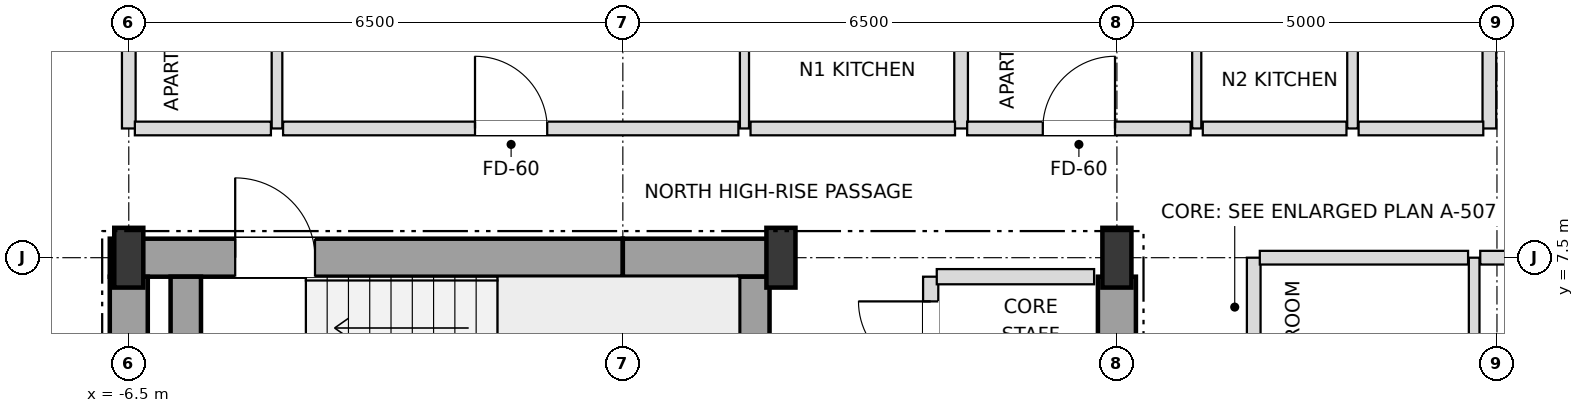
"""IFC4 building model, lengths in metres.
Left out: names, types, materials, properties, quantities, classifications, styles, units other than length and angle.
Written with IfcOpenShell. Run it as: python <this file> out.ifc"""

import sys

from ifc_helpers import new_model, si_unit, direction, frame, frame_2d, origin, origin_2d, place, context, subcontext, project, spatial, rectangle, i_section, extrude, element, fill, save


model = new_model("IFC4")
c1 = context("Model", 3, precision=1e-05, world=origin(), true_north=direction((0.0, 1.0)))
c2 = subcontext(c1, "Body", "Model", "MODEL_VIEW")
j1 = project(units=[si_unit("LENGTHUNIT", "METRE"), si_unit("PLANEANGLEUNIT", "RADIAN")], contexts=[c1])
p1 = place(None, origin())
s1 = spatial("IfcSite", under=j1, at=p1, CompositionType="ELEMENT")
p2 = place(p1, origin())
s2 = spatial("IfcBuilding", under=s1, at=p2, CompositionType="ELEMENT")
p3 = place(p2, frame((0.0, 0.0, 254.7)))
s3 = spatial("IfcBuildingStorey", under=s2, at=p3, CompositionType="ELEMENT", Elevation=254.7)
for number, where, z_axis, x_axis in (
    (1, (-6.5, 7.5, 0.0), (0.0, 0.0, 1.0), (1.0, 0.0, 0.0)),
    (2, (2.08, 7.5, 0.0), (0.0, 0.0, 1.0), (1.0, 0.0, 0.0)),
    (3, (6.5, 7.5, 0.0), (0.0, 0.0, 1.0), (1.0, 0.0, 0.0)),
):
    element("IfcColumn", number, at=place(p3, frame(where, z_axis=z_axis, x_axis=x_axis)), inside=s3, PredefinedType="COLUMN", context=c2, shape_type="SweptSolid", body=[
        extrude(i_section(OverallWidth=0.382, OverallDepth=0.786, WebThickness=0.02, FlangeThickness=0.033, at=origin_2d()), origin(), (0.0, 0.0, 1.0), 3.6),
    ])
p4 = place(p3, frame((-6.75, 7.5, 0.0), z_axis=(0.0, 0.0, 1.0), x_axis=(1.0, 0.0, 0.0)))
e4 = element("IfcWall", 4, at=p4, inside=s3, PredefinedType="SHEAR", context=c2, shape_type="SweptSolid", body=[
    extrude(rectangle(XDim=6.75, YDim=0.5, at=frame_2d((3.375, 0.0))), origin(), (0.0, 0.0, 1.0), 3.38),
])
p5 = place(p4, frame((1.65, 0.0, 0.0)))
e5 = element("IfcOpeningElement", 5, at=p5, cuts=e4, PredefinedType="OPENING", context=c2, shape_type="SweptSolid", body=[
    extrude(rectangle(XDim=1.05, YDim=2.15, at=frame_2d((0.525, 1.075))), frame((0.0, 0.26, 0.0), z_axis=(0.0, -1.0, 0.0), x_axis=(1.0, 0.0, 0.0)), (0.0, 0.0, 1.0), 0.52),
])
p6 = place(p3, frame((0.0, 7.5, 0.0), z_axis=(0.0, 0.0, 1.0), x_axis=(1.0, 0.0, 0.0)))
e6 = element("IfcWall", 6, at=p6, inside=s3, PredefinedType="SHEAR", context=c2, shape_type="SweptSolid", body=[
    extrude(rectangle(XDim=2.08, YDim=0.5, at=frame_2d((1.04, 0.0))), origin(), (0.0, 0.0, 1.0), 3.38),
])
for number, where, z_axis, x_axis in (
    (7, (-6.5, 3.95, 0.0), (0.0, 0.0, 1.0), (0.0, 1.0, 0.0)),
    (8, (6.5, 3.95, 0.0), (0.0, 0.0, 1.0), (0.0, 1.0, 0.0)),
):
    element("IfcWall", number, at=place(p3, frame(where, z_axis=z_axis, x_axis=x_axis)), inside=s3, PredefinedType="SHEAR", context=c2, shape_type="SweptSolid", body=[
        extrude(rectangle(XDim=3.3, YDim=0.5, at=frame_2d((1.65, 0.0))), origin(), (0.0, 0.0, 1.0), 3.38),
    ])
for number, where, z_axis, x_axis in (
    (9, (1.73, 3.95, 0.0), (0.0, 0.0, 1.0), (0.0, 1.0, 0.0)),
    (10, (-5.75, 3.95, 0.0), (0.0, 0.0, 1.0), (0.0, 1.0, 0.0)),
):
    element("IfcWall", number, at=place(p3, frame(where, z_axis=z_axis, x_axis=x_axis)), inside=s3, PredefinedType="SHEAR", context=c2, shape_type="SweptSolid", body=[
        extrude(rectangle(XDim=3.3, YDim=0.4, at=frame_2d((1.65, 0.0))), origin(), (0.0, 0.0, 1.0), 3.38),
    ])
p7 = place(p3, frame((-6.5, 9.2, 0.0), z_axis=(0.0, 0.0, 1.0), x_axis=(0.0, 1.0, 0.0)))
e11 = element("IfcWall", 11, at=p7, inside=s3, PredefinedType="PARTITIONING", context=c2, shape_type="SweptSolid", body=[
    extrude(rectangle(XDim=10.7, YDim=0.18, at=frame_2d((5.35, 0.0))), origin(), (0.0, 0.0, 1.0), 2.826),
])
p8 = place(p3, frame((-4.55, 9.2, 0.0), z_axis=(0.0, 0.0, 1.0), x_axis=(0.0, 1.0, 0.0)))
e12 = element("IfcWall", 12, at=p8, inside=s3, PredefinedType="PARTITIONING", context=c2, shape_type="SweptSolid", body=[
    extrude(rectangle(XDim=4.7, YDim=0.14, at=frame_2d((2.35, 0.0))), origin(), (0.0, 0.0, 1.0), 3.38),
])
p9 = place(p8, frame((1.9, 0.0, 0.0)))
e13 = element("IfcOpeningElement", 13, at=p9, cuts=e12, PredefinedType="OPENING", context=c2, shape_type="SweptSolid", body=[
    extrude(rectangle(XDim=0.9, YDim=2.1, at=frame_2d((0.45, 1.05))), frame((0.0, 0.08, 0.0), z_axis=(0.0, -1.0, 0.0), x_axis=(1.0, 0.0, 0.0)), (0.0, 0.0, 1.0), 0.16),
])
p10 = place(p3, frame((1.6, 9.2, 0.0), z_axis=(0.0, 0.0, 1.0), x_axis=(0.0, 1.0, 0.0)))
e14 = element("IfcWall", 14, at=p10, inside=s3, PredefinedType="PARTITIONING", context=c2, shape_type="SweptSolid", body=[
    extrude(rectangle(XDim=10.7, YDim=0.12, at=frame_2d((5.35, 0.0))), origin(), (0.0, 0.0, 1.0), 3.018),
])
p11 = place(p10, frame((1.875, 0.0, 0.0)))
e15 = element("IfcOpeningElement", 15, at=p11, cuts=e14, PredefinedType="OPENING", context=c2, shape_type="SweptSolid", body=[
    extrude(rectangle(XDim=0.95, YDim=2.1, at=frame_2d((0.475, 1.05))), frame((0.0, 0.07, 0.0), z_axis=(0.0, -1.0, 0.0), x_axis=(1.0, 0.0, 0.0)), (0.0, 0.0, 1.0), 0.14),
])
p12 = place(p10, frame((7.25, 0.0, 0.0)))
e16 = element("IfcOpeningElement", 16, at=p12, cuts=e14, PredefinedType="OPENING", context=c2, shape_type="SweptSolid", body=[
    extrude(rectangle(XDim=0.9, YDim=2.1, at=frame_2d((0.45, 1.05))), frame((0.0, 0.07, 0.0), z_axis=(0.0, -1.0, 0.0), x_axis=(1.0, 0.0, 0.0)), (0.0, 0.0, 1.0), 0.14),
])
p13 = place(p3, frame((4.05, 4.2, 0.0), z_axis=(0.0, 0.0, 1.0), x_axis=(0.0, 1.0, 0.0)))
e17 = element("IfcWall", 17, at=p13, inside=s3, PredefinedType="SOLIDWALL", context=c2, shape_type="SweptSolid", body=[
    extrude(rectangle(XDim=3.05, YDim=0.2, at=frame_2d((1.525, 0.0))), origin(), (0.0, 0.0, 1.0), 3.38),
])
p14 = place(p13, frame((0.275, 0.0, 0.0)))
e18 = element("IfcOpeningElement", 18, at=p14, cuts=e17, PredefinedType="OPENING", context=c2, shape_type="SweptSolid", body=[
    extrude(rectangle(XDim=0.95, YDim=2.15, at=frame_2d((0.475, 1.075))), frame((0.0, 0.11, 0.0), z_axis=(0.0, -1.0, 0.0), x_axis=(1.0, 0.0, 0.0)), (0.0, 0.0, 1.0), 0.22),
])
p15 = place(p13, frame((1.775, 0.0, 0.0)))
e19 = element("IfcOpeningElement", 19, at=p15, cuts=e17, PredefinedType="OPENING", context=c2, shape_type="SweptSolid", body=[
    extrude(rectangle(XDim=0.95, YDim=2.15, at=frame_2d((0.475, 1.075))), frame((0.0, 0.11, 0.0), z_axis=(0.0, -1.0, 0.0), x_axis=(1.0, 0.0, 0.0)), (0.0, 0.0, 1.0), 0.22),
])
p16 = place(p3, frame((4.45, 9.2, 0.0), z_axis=(0.0, 0.0, 1.0), x_axis=(0.0, 1.0, 0.0)))
e20 = element("IfcWall", 20, at=p16, inside=s3, PredefinedType="PARTITIONING", context=c2, shape_type="SweptSolid", body=[
    extrude(rectangle(XDim=10.7, YDim=0.18, at=frame_2d((5.35, 0.0))), origin(), (0.0, 0.0, 1.0), 3.018),
])
p17 = place(p3, frame((7.55, 9.2, 0.0), z_axis=(0.0, 0.0, 1.0), x_axis=(0.0, 1.0, 0.0)))
e21 = element("IfcWall", 21, at=p17, inside=s3, PredefinedType="PARTITIONING", context=c2, shape_type="SweptSolid", body=[
    extrude(rectangle(XDim=4.7, YDim=0.12, at=frame_2d((2.35, 0.0))), origin(), (0.0, 0.0, 1.0), 2.826),
])
p18 = place(p17, frame((1.875, 0.0, 0.0)))
e22 = element("IfcOpeningElement", 22, at=p18, cuts=e21, PredefinedType="OPENING", context=c2, shape_type="SweptSolid", body=[
    extrude(rectangle(XDim=0.95, YDim=2.1, at=frame_2d((0.475, 1.05))), frame((0.0, 0.07, 0.0), z_axis=(0.0, -1.0, 0.0), x_axis=(1.0, 0.0, 0.0)), (0.0, 0.0, 1.0), 0.14),
])
p19 = place(p3, frame((8.3, -7.5, 0.0), z_axis=(0.0, 0.0, 1.0), x_axis=(0.0, 1.0, 0.0)))
e23 = element("IfcWall", 23, at=p19, inside=s3, PredefinedType="PARTITIONING", context=c2, shape_type="SweptSolid", body=[
    extrude(rectangle(XDim=15.0, YDim=0.18, at=frame_2d((7.5, 0.0))), origin(), (0.0, 0.0, 1.0), 3.38),
])
p20 = place(p19, frame((2.355, 0.0, 0.0)))
e24 = element("IfcOpeningElement", 24, at=p20, cuts=e23, PredefinedType="OPENING", context=c2, shape_type="SweptSolid", body=[
    extrude(rectangle(XDim=0.95, YDim=2.15, at=frame_2d((0.475, 1.075))), frame((0.0, 0.1, 0.0), z_axis=(0.0, -1.0, 0.0), x_axis=(1.0, 0.0, 0.0)), (0.0, 0.0, 1.0), 0.2),
])
p21 = place(p3, frame((9.6, 9.2, 0.0), z_axis=(0.0, 0.0, 1.0), x_axis=(0.0, 1.0, 0.0)))
e25 = element("IfcWall", 25, at=p21, inside=s3, PredefinedType="PARTITIONING", context=c2, shape_type="SweptSolid", body=[
    extrude(rectangle(XDim=4.7, YDim=0.14, at=frame_2d((2.35, 0.0))), origin(), (0.0, 0.0, 1.0), 2.826),
])
p22 = place(p21, frame((1.9, 0.0, 0.0)))
e26 = element("IfcOpeningElement", 26, at=p22, cuts=e25, PredefinedType="OPENING", context=c2, shape_type="SweptSolid", body=[
    extrude(rectangle(XDim=0.9, YDim=2.1, at=frame_2d((0.45, 1.05))), frame((0.0, 0.08, 0.0), z_axis=(0.0, -1.0, 0.0), x_axis=(1.0, 0.0, 0.0)), (0.0, 0.0, 1.0), 0.16),
])
p23 = place(p3, frame((11.2, -7.5, 0.0), z_axis=(0.0, 0.0, 1.0), x_axis=(0.0, 1.0, 0.0)))
e27 = element("IfcWall", 27, at=p23, inside=s3, PredefinedType="PARTITIONING", context=c2, shape_type="SweptSolid", body=[
    extrude(rectangle(XDim=15.0, YDim=0.14, at=frame_2d((7.5, 0.0))), origin(), (0.0, 0.0, 1.0), 3.38),
])
p24 = place(p23, frame((3.475, 0.0, 0.0)))
e28 = element("IfcOpeningElement", 28, at=p24, cuts=e27, PredefinedType="OPENING", context=c2, shape_type="SweptSolid", body=[
    extrude(rectangle(XDim=0.95, YDim=2.1, at=frame_2d((0.475, 1.05))), frame((0.0, 0.08, 0.0), z_axis=(0.0, -1.0, 0.0), x_axis=(1.0, 0.0, 0.0)), (0.0, 0.0, 1.0), 0.16),
])
p25 = place(p3, frame((11.4, 9.2, 0.0), z_axis=(0.0, 0.0, 1.0), x_axis=(0.0, 1.0, 0.0)))
e29 = element("IfcWall", 29, at=p25, inside=s3, PredefinedType="PARTITIONING", context=c2, shape_type="SweptSolid", body=[
    extrude(rectangle(XDim=5.07, YDim=0.18, at=frame_2d((2.535, 0.0))), origin(), (0.0, 0.0, 1.0), 2.748),
])
p26 = place(p3, frame((4.13, 7.25, 0.0), z_axis=(0.0, 0.0, 1.0), x_axis=(1.0, 0.0, 0.0)))
e30 = element("IfcWall", 30, at=p26, inside=s3, PredefinedType="SOLIDWALL", context=c2, shape_type="SweptSolid", body=[
    extrude(rectangle(XDim=2.07, YDim=0.2, at=frame_2d((1.035, 0.0))), origin(), (0.0, 0.0, 1.0), 3.38),
])
p27 = place(p3, frame((8.38, 7.5, 0.0), z_axis=(0.0, 0.0, 1.0), x_axis=(1.0, 0.0, 0.0)))
e31 = element("IfcWall", 31, at=p27, inside=s3, PredefinedType="PARTITIONING", context=c2, shape_type="SweptSolid", body=[
    extrude(rectangle(XDim=2.74, YDim=0.18, at=frame_2d((1.37, 0.0))), origin(), (0.0, 0.0, 1.0), 2.826),
])
p28 = place(p3, frame((11.28, 7.5, 0.0), z_axis=(0.0, 0.0, 1.0), x_axis=(1.0, 0.0, 0.0)))
e32 = element("IfcWall", 32, at=p28, inside=s3, PredefinedType="PARTITIONING", context=c2, shape_type="SweptSolid", body=[
    extrude(rectangle(XDim=5.62, YDim=0.18, at=frame_2d((2.81, 0.0))), origin(), (0.0, 0.0, 1.0), 2.826),
])
p29 = place(p3, frame((-6.42, 9.2, 0.0), z_axis=(0.0, 0.0, 1.0), x_axis=(1.0, 0.0, 0.0)))
e33 = element("IfcWall", 33, at=p29, inside=s3, PredefinedType="PARTITIONING", context=c2, shape_type="SweptSolid", body=[
    extrude(rectangle(XDim=1.79, YDim=0.18, at=frame_2d((0.895, 0.0))), origin(), (0.0, 0.0, 1.0), 3.38),
])
p30 = place(p3, frame((-4.47, 9.2, 0.0), z_axis=(0.0, 0.0, 1.0), x_axis=(1.0, 0.0, 0.0)))
e34 = element("IfcWall", 34, at=p30, inside=s3, PredefinedType="PARTITIONING", context=c2, shape_type="SweptSolid", body=[
    extrude(rectangle(XDim=5.99, YDim=0.18, at=frame_2d((2.995, 0.0))), origin(), (0.0, 0.0, 1.0), 3.38),
])
p31 = place(p30, frame((2.525, 0.0, 0.0)))
e35 = element("IfcOpeningElement", 35, at=p31, cuts=e34, PredefinedType="OPENING", context=c2, shape_type="SweptSolid", body=[
    extrude(rectangle(XDim=0.95, YDim=2.15, at=frame_2d((0.475, 1.075))), frame((0.0, 0.1, 0.0), z_axis=(0.0, -1.0, 0.0), x_axis=(1.0, 0.0, 0.0)), (0.0, 0.0, 1.0), 0.2),
])
p32 = place(p3, frame((1.68, 9.2, 0.0), z_axis=(0.0, 0.0, 1.0), x_axis=(1.0, 0.0, 0.0)))
e36 = element("IfcWall", 36, at=p32, inside=s3, PredefinedType="PARTITIONING", context=c2, shape_type="SweptSolid", body=[
    extrude(rectangle(XDim=2.69, YDim=0.18, at=frame_2d((1.345, 0.0))), origin(), (0.0, 0.0, 1.0), 3.38),
])
p33 = place(p3, frame((4.53, 9.2, 0.0), z_axis=(0.0, 0.0, 1.0), x_axis=(1.0, 0.0, 0.0)))
e37 = element("IfcWall", 37, at=p33, inside=s3, PredefinedType="PARTITIONING", context=c2, shape_type="SweptSolid", body=[
    extrude(rectangle(XDim=2.94, YDim=0.18, at=frame_2d((1.47, 0.0))), origin(), (0.0, 0.0, 1.0), 2.826),
])
p34 = place(p33, frame((0.995, 0.0, 0.0)))
e38 = element("IfcOpeningElement", 38, at=p34, cuts=e37, PredefinedType="OPENING", context=c2, shape_type="SweptSolid", body=[
    extrude(rectangle(XDim=0.95, YDim=2.15, at=frame_2d((0.475, 1.075))), frame((0.0, 0.1, 0.0), z_axis=(0.0, -1.0, 0.0), x_axis=(1.0, 0.0, 0.0)), (0.0, 0.0, 1.0), 0.2),
])
p35 = place(p3, frame((7.63, 9.2, 0.0), z_axis=(0.0, 0.0, 1.0), x_axis=(1.0, 0.0, 0.0)))
e39 = element("IfcWall", 39, at=p35, inside=s3, PredefinedType="PARTITIONING", context=c2, shape_type="SweptSolid", body=[
    extrude(rectangle(XDim=1.89, YDim=0.18, at=frame_2d((0.945, 0.0))), origin(), (0.0, 0.0, 1.0), 3.38),
])
p36 = place(p3, frame((9.68, 9.2, 0.0), z_axis=(0.0, 0.0, 1.0), x_axis=(1.0, 0.0, 0.0)))
e40 = element("IfcWall", 40, at=p36, inside=s3, PredefinedType="PARTITIONING", context=c2, shape_type="SweptSolid", body=[
    extrude(rectangle(XDim=1.64, YDim=0.18, at=frame_2d((0.82, 0.0))), origin(), (0.0, 0.0, 1.0), 3.38),
])
p37 = place(p5, origin())
e41 = element("IfcDoor", 41, at=p37, inside=s3, OperationType="SINGLE_SWING_LEFT", PredefinedType="DOOR", context=c2, shape_type="SweptSolid", body=[
    extrude(rectangle(XDim=1.05, YDim=2.15, at=frame_2d((0.525, 1.075))), frame((0.0, 0.025, 0.0), z_axis=(0.0, -1.0, 0.0), x_axis=(1.0, 0.0, 0.0)), (0.0, 0.0, 1.0), 0.05),
])
fill(e5, e41)
p38 = place(p15, origin())
e42 = element("IfcDoor", 42, at=p38, inside=s3, OperationType="SINGLE_SWING_RIGHT", PredefinedType="DOOR", context=c2, shape_type="SweptSolid", body=[
    extrude(rectangle(XDim=0.95, YDim=2.15, at=frame_2d((0.475, 1.075))), frame((0.0, 0.025, 0.0), z_axis=(0.0, -1.0, 0.0), x_axis=(1.0, 0.0, 0.0)), (0.0, 0.0, 1.0), 0.05),
])
fill(e19, e42)
p39 = place(p31, origin())
e43 = element("IfcDoor", 43, at=p39, inside=s3, OperationType="SINGLE_SWING_LEFT", PredefinedType="DOOR", context=c2, shape_type="SweptSolid", body=[
    extrude(rectangle(XDim=0.95, YDim=2.15, at=frame_2d((0.475, 1.075))), frame((0.0, 0.025, 0.0), z_axis=(0.0, -1.0, 0.0), x_axis=(1.0, 0.0, 0.0)), (0.0, 0.0, 1.0), 0.05),
])
fill(e35, e43)
p40 = place(p34, origin())
e44 = element("IfcDoor", 44, at=p40, inside=s3, OperationType="SINGLE_SWING_RIGHT", PredefinedType="DOOR", context=c2, shape_type="SweptSolid", body=[
    extrude(rectangle(XDim=0.95, YDim=2.15, at=frame_2d((0.475, 1.075))), frame((0.0, 0.025, 0.0), z_axis=(0.0, -1.0, 0.0), x_axis=(1.0, 0.0, 0.0)), (0.0, 0.0, 1.0), 0.05),
])
fill(e38, e44)
save(model, sys.argv[1])
